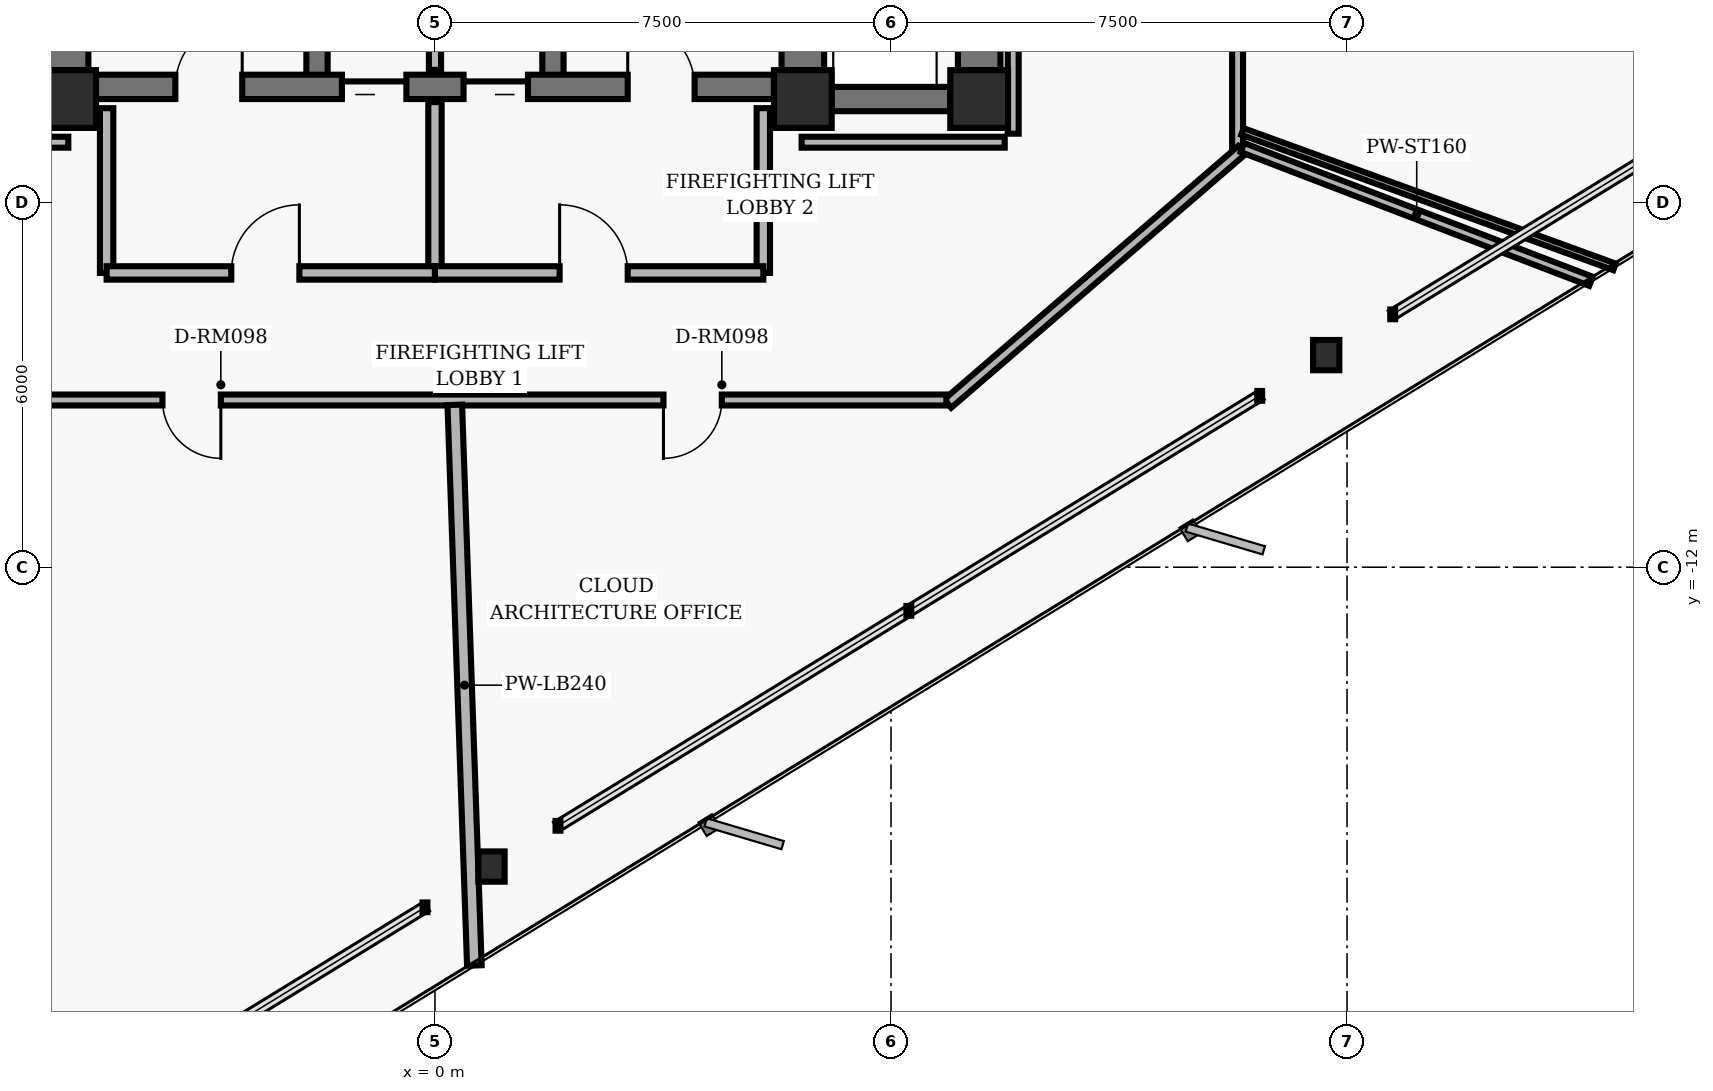
"""IFC4 building model, lengths in metres.
Left out: names, types, materials, properties, quantities, classifications, styles, units other than length and angle.
Written with IfcOpenShell. Run it as: python <this file> out.ifc"""

import sys

from ifc_helpers import new_model, si_unit, direction, frame, frame_2d, origin, origin_2d, place, context, subcontext, project, spatial, rectangle, hollow_rectangle, i_section, extrude, element, fill, save


model = new_model("IFC4")
c1 = context("Model", 3, precision=1e-05, world=origin(), true_north=direction((0.0, 1.0)))
c2 = subcontext(c1, "Body", "Model", "MODEL_VIEW")
j1 = project(units=[si_unit("LENGTHUNIT", "METRE"), si_unit("PLANEANGLEUNIT", "RADIAN")], contexts=[c1])
p1 = place(None, origin())
s1 = spatial("IfcSite", under=j1, at=p1, CompositionType="ELEMENT")
p2 = place(p1, origin())
s2 = spatial("IfcBuilding", under=s1, at=p2, CompositionType="ELEMENT")
p3 = place(p2, frame((0.0, 0.0, 22.24)))
s3 = spatial("IfcBuildingStorey", under=s2, at=p3, CompositionType="ELEMENT", Elevation=22.24)
for number, where, z_axis, x_axis in (
    (1, (-6.05, -4.3, 0.0), (0.0, 0.0, 1.0), (1.0, 0.0, 0.0)),
    (2, (6.05, -4.3, 0.0), (0.0, 0.0, 1.0), (1.0, 0.0, 0.0)),
    (3, (8.95, -4.3, 0.0), (0.0, 0.0, 1.0), (1.0, 0.0, 0.0)),
):
    element("IfcColumn", number, at=place(p3, frame(where, z_axis=z_axis, x_axis=x_axis)), inside=s3, PredefinedType="COLUMN", context=c2, shape_type="SweptSolid", body=[
        extrude(hollow_rectangle(XDim=0.95, YDim=0.95, WallThickness=0.06, InnerFilletRadius=0.02, OuterFilletRadius=0.04, at=origin_2d()), origin(), (0.0, 0.0, 1.0), 3.36),
    ])
for number, where, z_axis, x_axis in (
    (4, (-6.05, -3.825, 0.0), (0.0, 0.0, 1.0), (0.0, 1.0, 0.0)),
    (5, (6.05, -3.825, 0.0), (0.0, 0.0, 1.0), (0.0, 1.0, 0.0)),
):
    element("IfcWall", number, at=place(p3, frame(where, z_axis=z_axis, x_axis=x_axis)), inside=s3, PredefinedType="SHEAR", context=c2, shape_type="SweptSolid", body=[
        extrude(rectangle(XDim=3.35, YDim=0.7, at=frame_2d((1.675, 0.0))), origin(), (0.0, 0.0, 1.0), 3.098),
    ])
for number, where, z_axis, x_axis in (
    (6, (-1.94, -4.1, 0.0), (0.0, 0.0, 1.0), (0.0, 1.0, 0.0)),
    (7, (1.94, -4.1, 0.0), (0.0, 0.0, 1.0), (0.0, 1.0, 0.0)),
):
    element("IfcWall", number, at=place(p3, frame(where, z_axis=z_axis, x_axis=x_axis)), inside=s3, PredefinedType="SHEAR", context=c2, shape_type="SweptSolid", body=[
        extrude(rectangle(XDim=8.2, YDim=0.35, at=frame_2d((4.1, 0.0))), origin(), (0.0, 0.0, 1.0), 3.098),
    ])
p4 = place(p3, frame((-5.575, -4.1, 0.0), z_axis=(0.0, 0.0, 1.0), x_axis=(1.0, 0.0, 0.0)))
e8 = element("IfcWall", 8, at=p4, inside=s3, PredefinedType="SHEAR", context=c2, shape_type="SweptSolid", body=[
    extrude(rectangle(XDim=11.15, YDim=0.4, at=frame_2d((5.575, 0.0))), origin(), (0.0, 0.0, 1.0), 3.098),
])
p5 = place(p4, frame((1.305, 0.0, 0.0)))
e9 = element("IfcOpeningElement", 9, at=p5, cuts=e8, PredefinedType="OPENING", context=c2, shape_type="SweptSolid", body=[
    extrude(rectangle(XDim=1.1, YDim=2.04, at=frame_2d((0.55, 1.02))), frame((0.0, 0.21, 0.0), z_axis=(0.0, -1.0, 0.0), x_axis=(1.0, 0.0, 0.0)), (0.0, 0.0, 1.0), 0.42),
])
p6 = place(p4, frame((8.745, 0.0, 0.0)))
e10 = element("IfcOpeningElement", 10, at=p6, cuts=e8, PredefinedType="OPENING", context=c2, shape_type="SweptSolid", body=[
    extrude(rectangle(XDim=1.1, YDim=2.04, at=frame_2d((0.55, 1.02))), frame((0.0, 0.21, 0.0), z_axis=(0.0, -1.0, 0.0), x_axis=(1.0, 0.0, 0.0)), (0.0, 0.0, 1.0), 0.42),
])
p7 = place(p4, frame((4.045, 0.0, 0.0)))
e11 = element("IfcOpeningElement", 11, at=p7, cuts=e8, PredefinedType="OPENING", context=c2, shape_type="SweptSolid", body=[
    extrude(rectangle(XDim=1.06, YDim=2.04, at=frame_2d((0.53, 1.02))), frame((0.0, 0.21, 0.0), z_axis=(0.0, -1.0, 0.0), x_axis=(1.0, 0.0, 0.0)), (0.0, 0.0, 1.0), 0.42),
])
p8 = place(p4, frame((6.045, 0.0, 0.0)))
e12 = element("IfcOpeningElement", 12, at=p8, cuts=e8, PredefinedType="OPENING", context=c2, shape_type="SweptSolid", body=[
    extrude(rectangle(XDim=1.06, YDim=2.04, at=frame_2d((0.53, 1.02))), frame((0.0, 0.21, 0.0), z_axis=(0.0, -1.0, 0.0), x_axis=(1.0, 0.0, 0.0)), (0.0, 0.0, 1.0), 0.42),
])
p9 = place(p3, frame((8.95, -3.825, 0.0), z_axis=(0.0, 0.0, 1.0), x_axis=(0.0, 1.0, 0.0)))
e13 = element("IfcWall", 13, at=p9, inside=s3, PredefinedType="SHEAR", context=c2, shape_type="SweptSolid", body=[
    extrude(rectangle(XDim=7.85, YDim=0.7, at=frame_2d((3.925, 0.0))), origin(), (0.0, 0.0, 1.0), 3.098),
])
p10 = place(p3, frame((6.525, -4.3, 0.0), z_axis=(0.0, 0.0, 1.0), x_axis=(1.0, 0.0, 0.0)))
e14 = element("IfcWall", 14, at=p10, inside=s3, PredefinedType="SHEAR", context=c2, shape_type="SweptSolid", body=[
    extrude(rectangle(XDim=1.95, YDim=0.4, at=frame_2d((0.975, 0.0))), origin(), (0.0, 0.0, 1.0), 3.098),
])
for number, where, z_axis, x_axis in (
    (15, (0.93, -16.924, 0.0), (0.0, 0.0, 1.0), (1.0, 0.0, 0.0)),
    (16, (14.657, -8.512, 0.0), (0.0, 0.0, 1.0), (1.0, 0.0, 0.0)),
):
    element("IfcColumn", number, at=place(p3, frame(where, z_axis=z_axis, x_axis=x_axis)), inside=s3, PredefinedType="COLUMN", context=c2, shape_type="SweptSolid", body=[
        extrude(i_section(OverallWidth=0.432, OverallDepth=0.498, WebThickness=0.056, FlangeThickness=0.089, FilletRadius=0.025, at=origin_2d()), origin(), (0.0, 0.0, 1.0), 3.36),
    ])
p11 = place(p3, frame((0.0, -3.82, 0.0), z_axis=(0.0, 0.0, 1.0), x_axis=(0.0, 1.0, 0.0)))
e17 = element("IfcWall", 17, at=p11, inside=s3, PredefinedType="PARTITIONING", context=c2, shape_type="SweptSolid", body=[
    extrude(rectangle(XDim=2.67, YDim=0.2, at=frame_2d((1.335, 0.0))), origin(), (0.0, 0.0, 1.0), 3.073),
])
for number, where, z_axis, x_axis in (
    (18, (-5.4, -7.16, 0.0), (0.0, 0.0, 1.0), (0.0, 1.0, 0.0)),
    (19, (5.4, -7.16, 0.0), (0.0, 0.0, 1.0), (0.0, 1.0, 0.0)),
):
    element("IfcWall", number, at=place(p3, frame(where, z_axis=z_axis, x_axis=x_axis)), inside=s3, PredefinedType="PARTITIONING", context=c2, shape_type="SweptSolid", body=[
        extrude(rectangle(XDim=2.71, YDim=0.22, at=frame_2d((1.355, 0.0))), origin(), (0.0, 0.0, 1.0), 3.073),
    ])
p12 = place(p3, frame((0.0, -7.16, 0.0), z_axis=(0.0, 0.0, 1.0), x_axis=(0.0, 1.0, 0.0)))
e20 = element("IfcWall", 20, at=p12, inside=s3, PredefinedType="PARTITIONING", context=c2, shape_type="SweptSolid", body=[
    extrude(rectangle(XDim=2.81, YDim=0.22, at=frame_2d((1.405, 0.0))), origin(), (0.0, 0.0, 1.0), 3.073),
])
p13 = place(p3, frame((-5.4, -7.16, 0.0), z_axis=(0.0, 0.0, 1.0), x_axis=(1.0, 0.0, 0.0)))
e21 = element("IfcWall", 21, at=p13, inside=s3, PredefinedType="PARTITIONING", context=c2, shape_type="SweptSolid", body=[
    extrude(rectangle(XDim=5.4, YDim=0.22, at=frame_2d((2.7, 0.0))), origin(), (0.0, 0.0, 1.0), 3.073),
])
p14 = place(p13, frame((2.05, 0.0, 0.0)))
e22 = element("IfcOpeningElement", 22, at=p14, cuts=e21, PredefinedType="OPENING", context=c2, shape_type="SweptSolid", body=[
    extrude(rectangle(XDim=1.12, YDim=2.02, at=frame_2d((0.56, 1.01))), frame((0.0, 0.12, 0.0), z_axis=(0.0, -1.0, 0.0), x_axis=(1.0, 0.0, 0.0)), (0.0, 0.0, 1.0), 0.24),
])
p15 = place(p3, frame((0.0, -7.16, 0.0), z_axis=(0.0, 0.0, 1.0), x_axis=(1.0, 0.0, 0.0)))
e23 = element("IfcWall", 23, at=p15, inside=s3, PredefinedType="PARTITIONING", context=c2, shape_type="SweptSolid", body=[
    extrude(rectangle(XDim=5.4, YDim=0.22, at=frame_2d((2.7, 0.0))), origin(), (0.0, 0.0, 1.0), 3.073),
])
p16 = place(p15, frame((2.05, 0.0, 0.0)))
e24 = element("IfcOpeningElement", 24, at=p16, cuts=e23, PredefinedType="OPENING", context=c2, shape_type="SweptSolid", body=[
    extrude(rectangle(XDim=1.12, YDim=2.02, at=frame_2d((0.56, 1.01))), frame((0.0, 0.12, 0.0), z_axis=(0.0, -1.0, 0.0), x_axis=(1.0, 0.0, 0.0)), (0.0, 0.0, 1.0), 0.24),
])
p17 = place(p3, frame((13.2, 5.11, 0.0), z_axis=(0.0, 0.0, 1.0), x_axis=(0.0, -1.0, 0.0)))
e25 = element("IfcWall", 25, at=p17, inside=s3, PredefinedType="PARTITIONING", context=c2, shape_type="SweptSolid", body=[
    extrude(rectangle(XDim=10.22, YDim=0.18, at=frame_2d((5.11, 0.0))), origin(), (0.0, 0.0, 1.0), 3.073),
])
p18 = place(p17, frame((4.591, 0.0, 0.0)))
e26 = element("IfcOpeningElement", 26, at=p18, cuts=e25, PredefinedType="OPENING", context=c2, shape_type="SweptSolid", body=[
    extrude(rectangle(XDim=1.02, YDim=2.02, at=frame_2d((0.51, 1.01))), frame((0.0, 0.1, 0.0), z_axis=(0.0, -1.0, 0.0), x_axis=(1.0, 0.0, 0.0)), (0.0, 0.0, 1.0), 0.2),
])
p19 = place(p3, frame((13.268, -5.141, 0.0), z_axis=(0.0, 0.0, 1.0), x_axis=(-0.757534501725, -0.65279512766, 0.0)))
e27 = element("IfcWall", 27, at=p19, inside=s3, PredefinedType="PARTITIONING", context=c2, shape_type="SweptSolid", body=[
    extrude(rectangle(XDim=6.385, YDim=0.18, at=frame_2d((3.192, 0.0))), origin(), (0.0, 0.0, 1.0), 2.587),
])
p20 = place(p3, frame((8.41, -9.25, 0.0), z_axis=(0.0, 0.0, 1.0), x_axis=(-1.0, 0.0, 0.0)))
e28 = element("IfcWall", 28, at=p20, inside=s3, PredefinedType="PARTITIONING", context=c2, shape_type="SweptSolid", body=[
    extrude(rectangle(XDim=17.0, YDim=0.18, at=frame_2d((8.5, 0.0))), origin(), (0.0, 0.0, 1.0), 2.587),
])
p21 = place(p20, frame((11.932, 0.0, 0.0)))
e29 = element("IfcOpeningElement", 29, at=p21, cuts=e28, PredefinedType="OPENING", context=c2, shape_type="SweptSolid", body=[
    extrude(rectangle(XDim=0.96, YDim=2.02, at=frame_2d((0.48, 1.01))), frame((0.0, 0.1, 0.0), z_axis=(0.0, -1.0, 0.0), x_axis=(1.0, 0.0, 0.0)), (0.0, 0.0, 1.0), 0.2),
])
p22 = place(p20, frame((3.692, 0.0, 0.0)))
e30 = element("IfcOpeningElement", 30, at=p22, cuts=e28, PredefinedType="OPENING", context=c2, shape_type="SweptSolid", body=[
    extrude(rectangle(XDim=0.96, YDim=2.02, at=frame_2d((0.48, 1.01))), frame((0.0, 0.1, 0.0), z_axis=(0.0, -1.0, 0.0), x_axis=(1.0, 0.0, 0.0)), (0.0, 0.0, 1.0), 0.2),
])
for number, where, z_axis, x_axis in (
    (31, (-9.37, -5.01, 0.0), (0.0, 0.0, 1.0), (1.0, 0.0, 0.0)),
    (32, (6.03, -5.01, 0.0), (0.0, 0.0, 1.0), (1.0, 0.0, 0.0)),
):
    element("IfcWall", number, at=place(p3, frame(where, z_axis=z_axis, x_axis=x_axis)), inside=s3, PredefinedType="PARTITIONING", context=c2, shape_type="SweptSolid", body=[
        extrude(rectangle(XDim=3.34, YDim=0.18, at=frame_2d((1.67, 0.0))), origin(), (0.0, 0.0, 1.0), 3.073),
    ])
p23 = place(p3, frame((9.51, -4.87, 0.0), z_axis=(0.0, 0.0, 1.0), x_axis=(0.0, 1.0, 0.0)))
e33 = element("IfcWall", 33, at=p23, inside=s3, PredefinedType="PARTITIONING", context=c2, shape_type="SweptSolid", body=[
    extrude(rectangle(XDim=9.74, YDim=0.18, at=frame_2d((4.87, 0.0))), origin(), (0.0, 0.0, 1.0), 3.073),
])
p24 = place(p3, frame((0.326, -9.33, 0.0), z_axis=(0.0, 0.0, 1.0), x_axis=(0.034901543767, -0.999390755532, 0.0)))
e34 = element("IfcWall", 34, at=p24, inside=s3, PredefinedType="PARTITIONING", context=c2, shape_type="SweptSolid", body=[
    extrude(rectangle(XDim=9.227, YDim=0.24, at=frame_2d((4.613, 0.0))), origin(), (0.0, 0.0, 1.0), 3.073),
])
p25 = place(p3, frame((13.28, -5.098, 0.0), z_axis=(0.0, 0.0, 1.0), x_axis=(0.933574999212, -0.358382087787, 0.0)))
e35 = element("IfcWall", 35, at=p25, inside=s3, PredefinedType="PARTITIONING", context=c2, shape_type="SweptSolid", body=[
    extrude(rectangle(XDim=6.139, YDim=0.16, at=frame_2d((3.07, 0.0))), origin(), (0.0, 0.0, 1.0), 3.073),
])
p26 = place(p3, frame((13.28, -4.833, 0.0), z_axis=(0.0, 0.0, 1.0), x_axis=(0.939690475906, -0.342026036278, 0.0)))
e36 = element("IfcWall", 36, at=p26, inside=s3, PredefinedType="MOVABLE", context=c2, shape_type="SweptSolid", body=[
    extrude(rectangle(XDim=6.511, YDim=0.115, at=frame_2d((3.256, 0.0))), origin(), (0.0, 0.0, 1.0), 3.073),
])
p27 = place(p5, origin())
e37 = element("IfcDoor", 37, at=p27, inside=s3, OperationType="SINGLE_SWING_RIGHT", PredefinedType="DOOR", context=c2, shape_type="SweptSolid", body=[
    extrude(rectangle(XDim=1.1, YDim=2.04, at=frame_2d((0.55, 1.02))), frame((0.0, 0.025, 0.0), z_axis=(0.0, -1.0, 0.0), x_axis=(1.0, 0.0, 0.0)), (0.0, 0.0, 1.0), 0.05),
])
fill(e9, e37)
p28 = place(p6, origin())
e38 = element("IfcDoor", 38, at=p28, inside=s3, OperationType="SINGLE_SWING_LEFT", PredefinedType="DOOR", context=c2, shape_type="SweptSolid", body=[
    extrude(rectangle(XDim=1.1, YDim=2.04, at=frame_2d((0.55, 1.02))), frame((0.0, 0.025, 0.0), z_axis=(0.0, -1.0, 0.0), x_axis=(1.0, 0.0, 0.0)), (0.0, 0.0, 1.0), 0.05),
])
fill(e10, e38)
p29 = place(p7, origin())
e39 = element("IfcDoor", 39, at=p29, inside=s3, OperationType="SLIDING_TO_LEFT", PredefinedType="DOOR", context=c2, shape_type="SweptSolid", body=[
    extrude(rectangle(XDim=1.06, YDim=2.04, at=frame_2d((0.53, 1.02))), frame((0.0, 0.025, 0.0), z_axis=(0.0, -1.0, 0.0), x_axis=(1.0, 0.0, 0.0)), (0.0, 0.0, 1.0), 0.05),
])
fill(e11, e39)
p30 = place(p8, origin())
e40 = element("IfcDoor", 40, at=p30, inside=s3, OperationType="SLIDING_TO_RIGHT", PredefinedType="DOOR", context=c2, shape_type="SweptSolid", body=[
    extrude(rectangle(XDim=1.06, YDim=2.04, at=frame_2d((0.53, 1.02))), frame((0.0, 0.025, 0.0), z_axis=(0.0, -1.0, 0.0), x_axis=(1.0, 0.0, 0.0)), (0.0, 0.0, 1.0), 0.05),
])
fill(e12, e40)
p31 = place(p14, origin())
e41 = element("IfcDoor", 41, at=p31, inside=s3, OperationType="SINGLE_SWING_RIGHT", PredefinedType="DOOR", context=c2, shape_type="SweptSolid", body=[
    extrude(rectangle(XDim=1.12, YDim=2.02, at=frame_2d((0.56, 1.01))), frame((0.0, 0.025, 0.0), z_axis=(0.0, -1.0, 0.0), x_axis=(1.0, 0.0, 0.0)), (0.0, 0.0, 1.0), 0.05),
])
fill(e22, e41)
p32 = place(p16, origin())
e42 = element("IfcDoor", 42, at=p32, inside=s3, OperationType="SINGLE_SWING_LEFT", PredefinedType="DOOR", context=c2, shape_type="SweptSolid", body=[
    extrude(rectangle(XDim=1.12, YDim=2.02, at=frame_2d((0.56, 1.01))), frame((0.0, 0.025, 0.0), z_axis=(0.0, -1.0, 0.0), x_axis=(1.0, 0.0, 0.0)), (0.0, 0.0, 1.0), 0.05),
])
fill(e24, e42)
p33 = place(p21, origin())
e43 = element("IfcDoor", 43, at=p33, inside=s3, OperationType="SINGLE_SWING_LEFT", PredefinedType="DOOR", context=c2, shape_type="SweptSolid", body=[
    extrude(rectangle(XDim=0.96, YDim=2.02, at=frame_2d((0.48, 1.01))), frame((0.0, 0.025, 0.0), z_axis=(0.0, -1.0, 0.0), x_axis=(1.0, 0.0, 0.0)), (0.0, 0.0, 1.0), 0.05),
])
fill(e29, e43)
p34 = place(p22, origin())
e44 = element("IfcDoor", 44, at=p34, inside=s3, OperationType="SINGLE_SWING_RIGHT", PredefinedType="DOOR", context=c2, shape_type="SweptSolid", body=[
    extrude(rectangle(XDim=0.96, YDim=2.02, at=frame_2d((0.48, 1.01))), frame((0.0, 0.025, 0.0), z_axis=(0.0, -1.0, 0.0), x_axis=(1.0, 0.0, 0.0)), (0.0, 0.0, 1.0), 0.05),
])
fill(e30, e44)
save(model, sys.argv[1])
